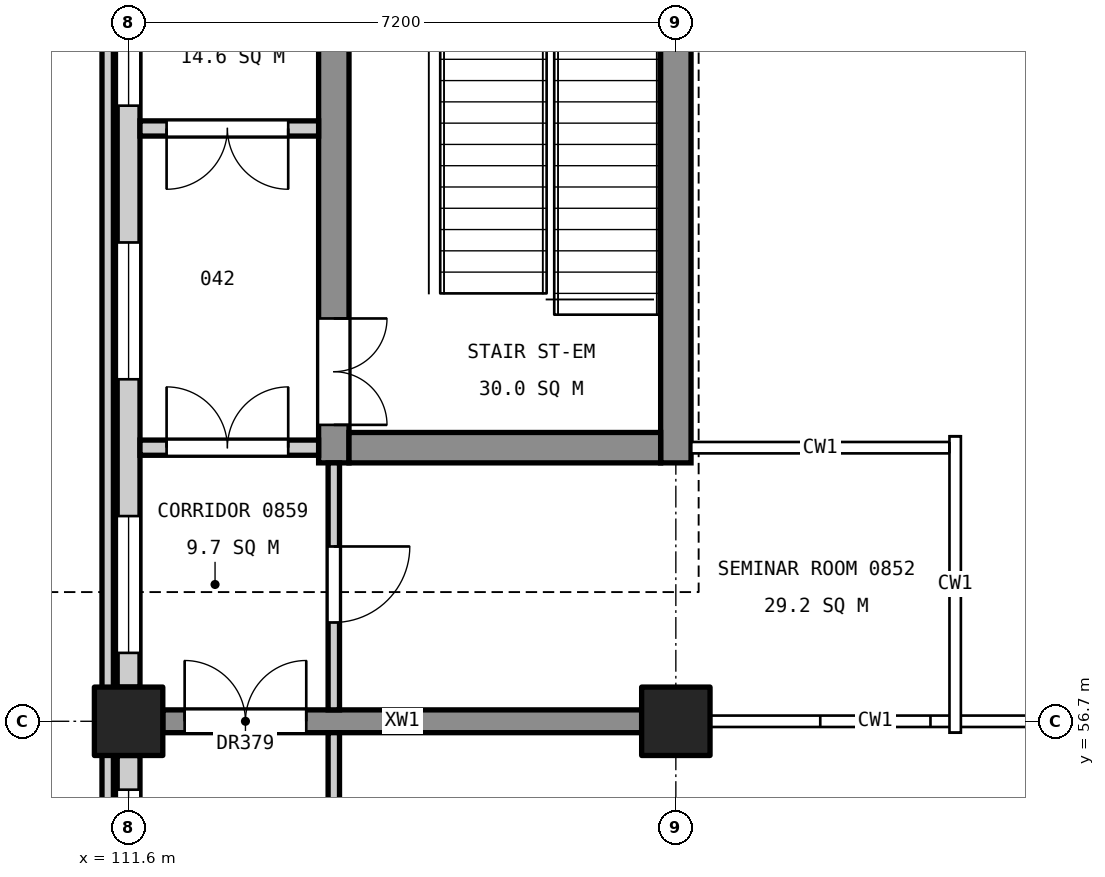
"""IFC4 building model, lengths in metres.
Left out: names, types, materials, properties, quantities, classifications, styles, units other than length and angle.
Written with IfcOpenShell. Run it as: python <this file> out.ifc"""

import sys

from ifc_helpers import new_model, si_unit, direction, frame, frame_2d, origin, origin_2d, place, context, subcontext, project, spatial, rectangle, extrude, element, fill, save


model = new_model("IFC4")
c1 = context("Model", 3, precision=1e-05, world=origin(), true_north=direction((0.0, 1.0)))
c2 = subcontext(c1, "Body", "Model", "MODEL_VIEW")
j1 = project(units=[si_unit("LENGTHUNIT", "METRE"), si_unit("PLANEANGLEUNIT", "RADIAN")], contexts=[c1])
p1 = place(None, origin())
s1 = spatial("IfcSite", under=j1, at=p1, CompositionType="ELEMENT")
p2 = place(p1, origin())
s2 = spatial("IfcBuilding", under=s1, at=p2, CompositionType="ELEMENT")
p3 = place(p2, frame((0.0, 0.0, 41.4)))
s3 = spatial("IfcBuildingStorey", under=s2, at=p3, CompositionType="ELEMENT", Elevation=41.4)
for number, where, z_axis, x_axis in (
    (1, (118.8, 56.7, 0.0), (0.0, 0.0, 1.0), (1.0, 0.0, 0.0)),
    (2, (111.6, 56.7, 0.0), (0.0, 0.0, 1.0), (1.0, 0.0, 0.0)),
):
    element("IfcColumn", number, at=place(p3, frame(where, z_axis=z_axis, x_axis=x_axis)), inside=s3, PredefinedType="COLUMN", context=c2, shape_type="SweptSolid", body=[
        extrude(rectangle(XDim=0.9, YDim=0.9, at=origin_2d()), origin(), (0.0, 0.0, 1.0), 4.8),
    ])
p4 = place(p3, frame((118.8, 60.1, 0.0), z_axis=(0.0, 0.0, 1.0), x_axis=(0.0, 1.0, 0.0)))
e3 = element("IfcWall", 3, at=p4, inside=s3, PredefinedType="SHEAR", context=c2, shape_type="SweptSolid", body=[
    extrude(rectangle(XDim=14.8, YDim=0.4, at=frame_2d((7.4, 0.0))), origin(), (0.0, 0.0, 1.0), 4.55),
])
p5 = place(p4, frame((6.11, 0.0, 3.4)))
e4 = element("IfcOpeningElement", 4, at=p5, cuts=e3, PredefinedType="OPENING", context=c2, shape_type="SweptSolid", body=[
    extrude(rectangle(XDim=1.2, YDim=0.9, at=frame_2d((0.6, 0.45))), frame((0.0, 0.21, 0.0), z_axis=(0.0, -1.0, 0.0), x_axis=(1.0, 0.0, 0.0)), (0.0, 0.0, 1.0), 0.42),
])
p6 = place(p3, frame((114.3, 60.1, 0.0), z_axis=(0.0, 0.0, 1.0), x_axis=(0.0, 1.0, 0.0)))
e5 = element("IfcWall", 5, at=p6, inside=s3, PredefinedType="SHEAR", context=c2, shape_type="SweptSolid", body=[
    extrude(rectangle(XDim=14.8, YDim=0.4, at=frame_2d((7.4, 0.0))), origin(), (0.0, 0.0, 1.0), 4.55),
])
p7 = place(p6, frame((0.5, 0.0, 0.0)))
e6 = element("IfcOpeningElement", 6, at=p7, cuts=e5, PredefinedType="OPENING", context=c2, shape_type="SweptSolid", body=[
    extrude(rectangle(XDim=1.4, YDim=2.1, at=frame_2d((0.7, 1.05))), frame((0.0, 0.21, 0.0), z_axis=(0.0, -1.0, 0.0), x_axis=(1.0, 0.0, 0.0)), (0.0, 0.0, 1.0), 0.42),
])
p8 = place(p6, frame((8.8, 0.0, 0.0)))
e7 = element("IfcOpeningElement", 7, at=p8, cuts=e5, PredefinedType="OPENING", context=c2, shape_type="SweptSolid", body=[
    extrude(rectangle(XDim=1.1, YDim=2.1, at=frame_2d((0.55, 1.05))), frame((0.0, 0.21, 0.0), z_axis=(0.0, -1.0, 0.0), x_axis=(1.0, 0.0, 0.0)), (0.0, 0.0, 1.0), 0.42),
])
p9 = place(p6, frame((11.35, 0.0, 0.0)))
e8 = element("IfcOpeningElement", 8, at=p9, cuts=e5, PredefinedType="OPENING", context=c2, shape_type="SweptSolid", body=[
    extrude(rectangle(XDim=1.1, YDim=2.1, at=frame_2d((0.55, 1.05))), frame((0.0, 0.21, 0.0), z_axis=(0.0, -1.0, 0.0), x_axis=(1.0, 0.0, 0.0)), (0.0, 0.0, 1.0), 0.42),
])
p10 = place(p3, frame((118.6, 60.3, 0.0), z_axis=(0.0, 0.0, 1.0), x_axis=(-1.0, 0.0, 0.0)))
e9 = element("IfcWall", 9, at=p10, inside=s3, PredefinedType="SHEAR", context=c2, shape_type="SweptSolid", body=[
    extrude(rectangle(XDim=4.1, YDim=0.4, at=frame_2d((2.05, 0.0))), origin(), (0.0, 0.0, 1.0), 4.55),
])
p11 = place(p3, frame((118.35, 56.7, 0.0), z_axis=(0.0, 0.0, 1.0), x_axis=(-1.0, 0.0, 0.0)))
e10 = element("IfcWall", 10, at=p11, inside=s3, PredefinedType="SHEAR", context=c2, shape_type="SweptSolid", body=[
    extrude(rectangle(XDim=6.3, YDim=0.3, at=frame_2d((3.15, 0.0))), origin(), (0.0, 0.0, 1.0), 4.55),
])
p12 = place(p11, frame((4.413, 0.0, 0.0)))
e11 = element("IfcOpeningElement", 11, at=p12, cuts=e10, PredefinedType="OPENING", context=c2, shape_type="SweptSolid", body=[
    extrude(rectangle(XDim=1.6, YDim=2.1, at=frame_2d((0.8, 1.05))), frame((0.0, 0.16, 0.0), z_axis=(0.0, -1.0, 0.0), x_axis=(1.0, 0.0, 0.0)), (0.0, 0.0, 1.0), 0.32),
])
p13 = place(p3, frame((111.325, 35.05, 0.0), z_axis=(0.0, 0.0, 1.0), x_axis=(0.0, 1.0, 0.0)))
e12 = element("IfcWall", 12, at=p13, inside=s3, PredefinedType="PARAPET", context=c2, shape_type="SweptSolid", body=[
    extrude(rectangle(XDim=64.9, YDim=0.15, at=frame_2d((32.45, 0.0))), origin(), (0.0, 0.0, 1.0), 0.3),
])
p14 = place(p3, frame((111.6, 46.35, 0.0), z_axis=(0.0, 0.0, 1.0), x_axis=(0.0, 1.0, 0.0)))
e13 = element("IfcWall", 13, at=p14, inside=s3, PredefinedType="STANDARD", context=c2, shape_type="SweptSolid", body=[
    extrude(rectangle(XDim=9.9, YDim=0.3, at=frame_2d((4.95, 0.0))), origin(), (0.0, 0.0, 1.0), 3.55),
])
p15 = place(p14, frame((0.45, 0.0, 0.9)))
e14 = element("IfcOpeningElement", 14, at=p15, cuts=e13, PredefinedType="OPENING", context=c2, shape_type="SweptSolid", body=[
    extrude(rectangle(XDim=1.8, YDim=2.4, at=frame_2d((0.9, 1.2))), frame((0.0, 0.16, 0.0), z_axis=(0.0, -1.0, 0.0), x_axis=(1.0, 0.0, 0.0)), (0.0, 0.0, 1.0), 0.32),
])
p16 = place(p14, frame((4.05, 0.0, 0.9)))
e15 = element("IfcOpeningElement", 15, at=p16, cuts=e13, PredefinedType="OPENING", context=c2, shape_type="SweptSolid", body=[
    extrude(rectangle(XDim=1.8, YDim=2.4, at=frame_2d((0.9, 1.2))), frame((0.0, 0.16, 0.0), z_axis=(0.0, -1.0, 0.0), x_axis=(1.0, 0.0, 0.0)), (0.0, 0.0, 1.0), 0.32),
])
p17 = place(p14, frame((7.65, 0.0, 0.9)))
e16 = element("IfcOpeningElement", 16, at=p17, cuts=e13, PredefinedType="OPENING", context=c2, shape_type="SweptSolid", body=[
    extrude(rectangle(XDim=1.8, YDim=2.4, at=frame_2d((0.9, 1.2))), frame((0.0, 0.16, 0.0), z_axis=(0.0, -1.0, 0.0), x_axis=(1.0, 0.0, 0.0)), (0.0, 0.0, 1.0), 0.32),
])
p18 = place(p3, frame((111.6, 57.15, 0.0), z_axis=(0.0, 0.0, 1.0), x_axis=(0.0, 1.0, 0.0)))
e17 = element("IfcWall", 17, at=p18, inside=s3, PredefinedType="STANDARD", context=c2, shape_type="SweptSolid", body=[
    extrude(rectangle(XDim=9.9, YDim=0.3, at=frame_2d((4.95, 0.0))), origin(), (0.0, 0.0, 1.0), 3.55),
])
p19 = place(p18, frame((0.45, 0.0, 0.9)))
e18 = element("IfcOpeningElement", 18, at=p19, cuts=e17, PredefinedType="OPENING", context=c2, shape_type="SweptSolid", body=[
    extrude(rectangle(XDim=1.8, YDim=2.4, at=frame_2d((0.9, 1.2))), frame((0.0, 0.16, 0.0), z_axis=(0.0, -1.0, 0.0), x_axis=(1.0, 0.0, 0.0)), (0.0, 0.0, 1.0), 0.32),
])
p20 = place(p18, frame((4.05, 0.0, 0.9)))
e19 = element("IfcOpeningElement", 19, at=p20, cuts=e17, PredefinedType="OPENING", context=c2, shape_type="SweptSolid", body=[
    extrude(rectangle(XDim=1.8, YDim=2.4, at=frame_2d((0.9, 1.2))), frame((0.0, 0.16, 0.0), z_axis=(0.0, -1.0, 0.0), x_axis=(1.0, 0.0, 0.0)), (0.0, 0.0, 1.0), 0.32),
])
p21 = place(p18, frame((7.65, 0.0, 0.9)))
e20 = element("IfcOpeningElement", 20, at=p21, cuts=e17, PredefinedType="OPENING", context=c2, shape_type="SweptSolid", body=[
    extrude(rectangle(XDim=1.8, YDim=2.4, at=frame_2d((0.9, 1.2))), frame((0.0, 0.16, 0.0), z_axis=(0.0, -1.0, 0.0), x_axis=(1.0, 0.0, 0.0)), (0.0, 0.0, 1.0), 0.32),
])
p22 = place(p3, frame((114.3, 46.1, 0.0), z_axis=(0.0, 0.0, 1.0), x_axis=(0.0, 1.0, 0.0)))
e21 = element("IfcWall", 21, at=p22, inside=s3, PredefinedType="PARTITIONING", context=c2, shape_type="SweptSolid", body=[
    extrude(rectangle(XDim=10.45, YDim=0.15, at=frame_2d((5.225, 0.0))), origin(), (0.0, 0.0, 1.0), 3.55),
])
p23 = place(p22, frame((4.7, 0.0, 0.0)))
e22 = element("IfcOpeningElement", 22, at=p23, cuts=e21, PredefinedType="OPENING", context=c2, shape_type="SweptSolid", body=[
    extrude(rectangle(XDim=1.0, YDim=2.1, at=frame_2d((0.5, 1.05))), frame((0.0, 0.085, 0.0), z_axis=(0.0, -1.0, 0.0), x_axis=(1.0, 0.0, 0.0)), (0.0, 0.0, 1.0), 0.17),
])
p24 = place(p3, frame((114.3, 56.85, 0.0), z_axis=(0.0, 0.0, 1.0), x_axis=(0.0, 1.0, 0.0)))
e23 = element("IfcWall", 23, at=p24, inside=s3, PredefinedType="PARTITIONING", context=c2, shape_type="SweptSolid", body=[
    extrude(rectangle(XDim=3.25, YDim=0.15, at=frame_2d((1.625, 0.0))), origin(), (0.0, 0.0, 1.0), 3.55),
])
p25 = place(p24, frame((1.15, 0.0, 0.0)))
e24 = element("IfcOpeningElement", 24, at=p25, cuts=e23, PredefinedType="OPENING", context=c2, shape_type="SweptSolid", body=[
    extrude(rectangle(XDim=1.0, YDim=2.1, at=frame_2d((0.5, 1.05))), frame((0.0, 0.085, 0.0), z_axis=(0.0, -1.0, 0.0), x_axis=(1.0, 0.0, 0.0)), (0.0, 0.0, 1.0), 0.17),
])
p26 = place(p3, frame((114.1, 60.3, 0.0), z_axis=(0.0, 0.0, 1.0), x_axis=(-1.0, 0.0, 0.0)))
e25 = element("IfcWall", 25, at=p26, inside=s3, PredefinedType="PARTITIONING", context=c2, shape_type="SweptSolid", body=[
    extrude(rectangle(XDim=2.35, YDim=0.2, at=frame_2d((1.175, 0.0))), origin(), (0.0, 0.0, 1.0), 3.85),
])
p27 = place(p26, frame((0.4, 0.0, 0.0)))
e26 = element("IfcOpeningElement", 26, at=p27, cuts=e25, PredefinedType="OPENING", context=c2, shape_type="SweptSolid", body=[
    extrude(rectangle(XDim=1.6, YDim=2.1, at=frame_2d((0.8, 1.05))), frame((0.0, 0.11, 0.0), z_axis=(0.0, -1.0, 0.0), x_axis=(1.0, 0.0, 0.0)), (0.0, 0.0, 1.0), 0.22),
])
p28 = place(p3, frame((114.1, 64.5, 0.0), z_axis=(0.0, 0.0, 1.0), x_axis=(-1.0, 0.0, 0.0)))
e27 = element("IfcWall", 27, at=p28, inside=s3, PredefinedType="PARTITIONING", context=c2, shape_type="SweptSolid", body=[
    extrude(rectangle(XDim=2.35, YDim=0.2, at=frame_2d((1.175, 0.0))), origin(), (0.0, 0.0, 1.0), 3.55),
])
p29 = place(p28, frame((0.4, 0.0, 0.0)))
e28 = element("IfcOpeningElement", 28, at=p29, cuts=e27, PredefinedType="OPENING", context=c2, shape_type="SweptSolid", body=[
    extrude(rectangle(XDim=1.6, YDim=2.1, at=frame_2d((0.8, 1.05))), frame((0.0, 0.11, 0.0), z_axis=(0.0, -1.0, 0.0), x_axis=(1.0, 0.0, 0.0)), (0.0, 0.0, 1.0), 0.22),
])
p30 = place(p7, frame((1.4, 0.0, 0.0), z_axis=(0.0, 0.0, 1.0), x_axis=(-1.0, 0.0, 0.0)))
e29 = element("IfcDoor", 29, at=p30, inside=s3, OperationType="DOUBLE_DOOR_SINGLE_SWING", PredefinedType="DOOR", context=c2, shape_type="SweptSolid", body=[
    extrude(rectangle(XDim=1.4, YDim=2.1, at=frame_2d((0.7, 1.05))), frame((0.0, 0.025, 0.0), z_axis=(0.0, -1.0, 0.0), x_axis=(1.0, 0.0, 0.0)), (0.0, 0.0, 1.0), 0.05),
])
fill(e6, e29)
p31 = place(p17, origin())
e30 = element("IfcWindow", 30, at=p31, inside=s3, PartitioningType="SINGLE_PANEL", PredefinedType="WINDOW", context=c2, shape_type="SweptSolid", body=[
    extrude(rectangle(XDim=1.8, YDim=2.4, at=frame_2d((0.9, 1.2))), frame((0.0, 0.03, 0.0), z_axis=(0.0, -1.0, 0.0), x_axis=(1.0, 0.0, 0.0)), (0.0, 0.0, 1.0), 0.06),
])
fill(e16, e30)
p32 = place(p19, origin())
e31 = element("IfcWindow", 31, at=p32, inside=s3, PartitioningType="SINGLE_PANEL", PredefinedType="WINDOW", context=c2, shape_type="SweptSolid", body=[
    extrude(rectangle(XDim=1.8, YDim=2.4, at=frame_2d((0.9, 1.2))), frame((0.0, 0.03, 0.0), z_axis=(0.0, -1.0, 0.0), x_axis=(1.0, 0.0, 0.0)), (0.0, 0.0, 1.0), 0.06),
])
fill(e18, e31)
p33 = place(p20, origin())
e32 = element("IfcWindow", 32, at=p33, inside=s3, PartitioningType="SINGLE_PANEL", PredefinedType="WINDOW", context=c2, shape_type="SweptSolid", body=[
    extrude(rectangle(XDim=1.8, YDim=2.4, at=frame_2d((0.9, 1.2))), frame((0.0, 0.03, 0.0), z_axis=(0.0, -1.0, 0.0), x_axis=(1.0, 0.0, 0.0)), (0.0, 0.0, 1.0), 0.06),
])
fill(e19, e32)
p34 = place(p21, origin())
e33 = element("IfcWindow", 33, at=p34, inside=s3, PartitioningType="SINGLE_PANEL", PredefinedType="WINDOW", context=c2, shape_type="SweptSolid", body=[
    extrude(rectangle(XDim=1.8, YDim=2.4, at=frame_2d((0.9, 1.2))), frame((0.0, 0.03, 0.0), z_axis=(0.0, -1.0, 0.0), x_axis=(1.0, 0.0, 0.0)), (0.0, 0.0, 1.0), 0.06),
])
fill(e20, e33)
p35 = place(p25, frame((1.0, 0.0, 0.0), z_axis=(0.0, 0.0, 1.0), x_axis=(-1.0, 0.0, 0.0)))
e34 = element("IfcDoor", 34, at=p35, inside=s3, OperationType="SINGLE_SWING_LEFT", PredefinedType="DOOR", context=c2, shape_type="SweptSolid", body=[
    extrude(rectangle(XDim=1.0, YDim=2.1, at=frame_2d((0.5, 1.05))), frame((0.0, 0.025, 0.0), z_axis=(0.0, -1.0, 0.0), x_axis=(1.0, 0.0, 0.0)), (0.0, 0.0, 1.0), 0.05),
])
fill(e24, e34)
p36 = place(p27, frame((1.6, 0.0, 0.0), z_axis=(0.0, 0.0, 1.0), x_axis=(-1.0, 0.0, 0.0)))
e35 = element("IfcDoor", 35, at=p36, inside=s3, OperationType="DOUBLE_DOOR_SINGLE_SWING", PredefinedType="DOOR", context=c2, shape_type="SweptSolid", body=[
    extrude(rectangle(XDim=1.6, YDim=2.1, at=frame_2d((0.8, 1.05))), frame((0.0, 0.025, 0.0), z_axis=(0.0, -1.0, 0.0), x_axis=(1.0, 0.0, 0.0)), (0.0, 0.0, 1.0), 0.05),
])
fill(e26, e35)
p37 = place(p29, origin())
e36 = element("IfcDoor", 36, at=p37, inside=s3, OperationType="DOUBLE_DOOR_SINGLE_SWING", PredefinedType="DOOR", context=c2, shape_type="SweptSolid", body=[
    extrude(rectangle(XDim=1.6, YDim=2.1, at=frame_2d((0.8, 1.05))), frame((0.0, 0.025, 0.0), z_axis=(0.0, -1.0, 0.0), x_axis=(1.0, 0.0, 0.0)), (0.0, 0.0, 1.0), 0.05),
])
fill(e28, e36)
p38 = place(p12, frame((1.6, 0.0, 0.0), z_axis=(0.0, 0.0, 1.0), x_axis=(-1.0, 0.0, 0.0)))
e37 = element("IfcDoor", 37, at=p38, inside=s3, OperationType="DOUBLE_DOOR_SINGLE_SWING", PredefinedType="DOOR", context=c2, shape_type="SweptSolid", body=[
    extrude(rectangle(XDim=1.6, YDim=2.1, at=frame_2d((0.8, 1.05))), frame((0.0, 0.025, 0.0), z_axis=(0.0, -1.0, 0.0), x_axis=(1.0, 0.0, 0.0)), (0.0, 0.0, 1.0), 0.05),
])
fill(e11, e37)
save(model, sys.argv[1])
